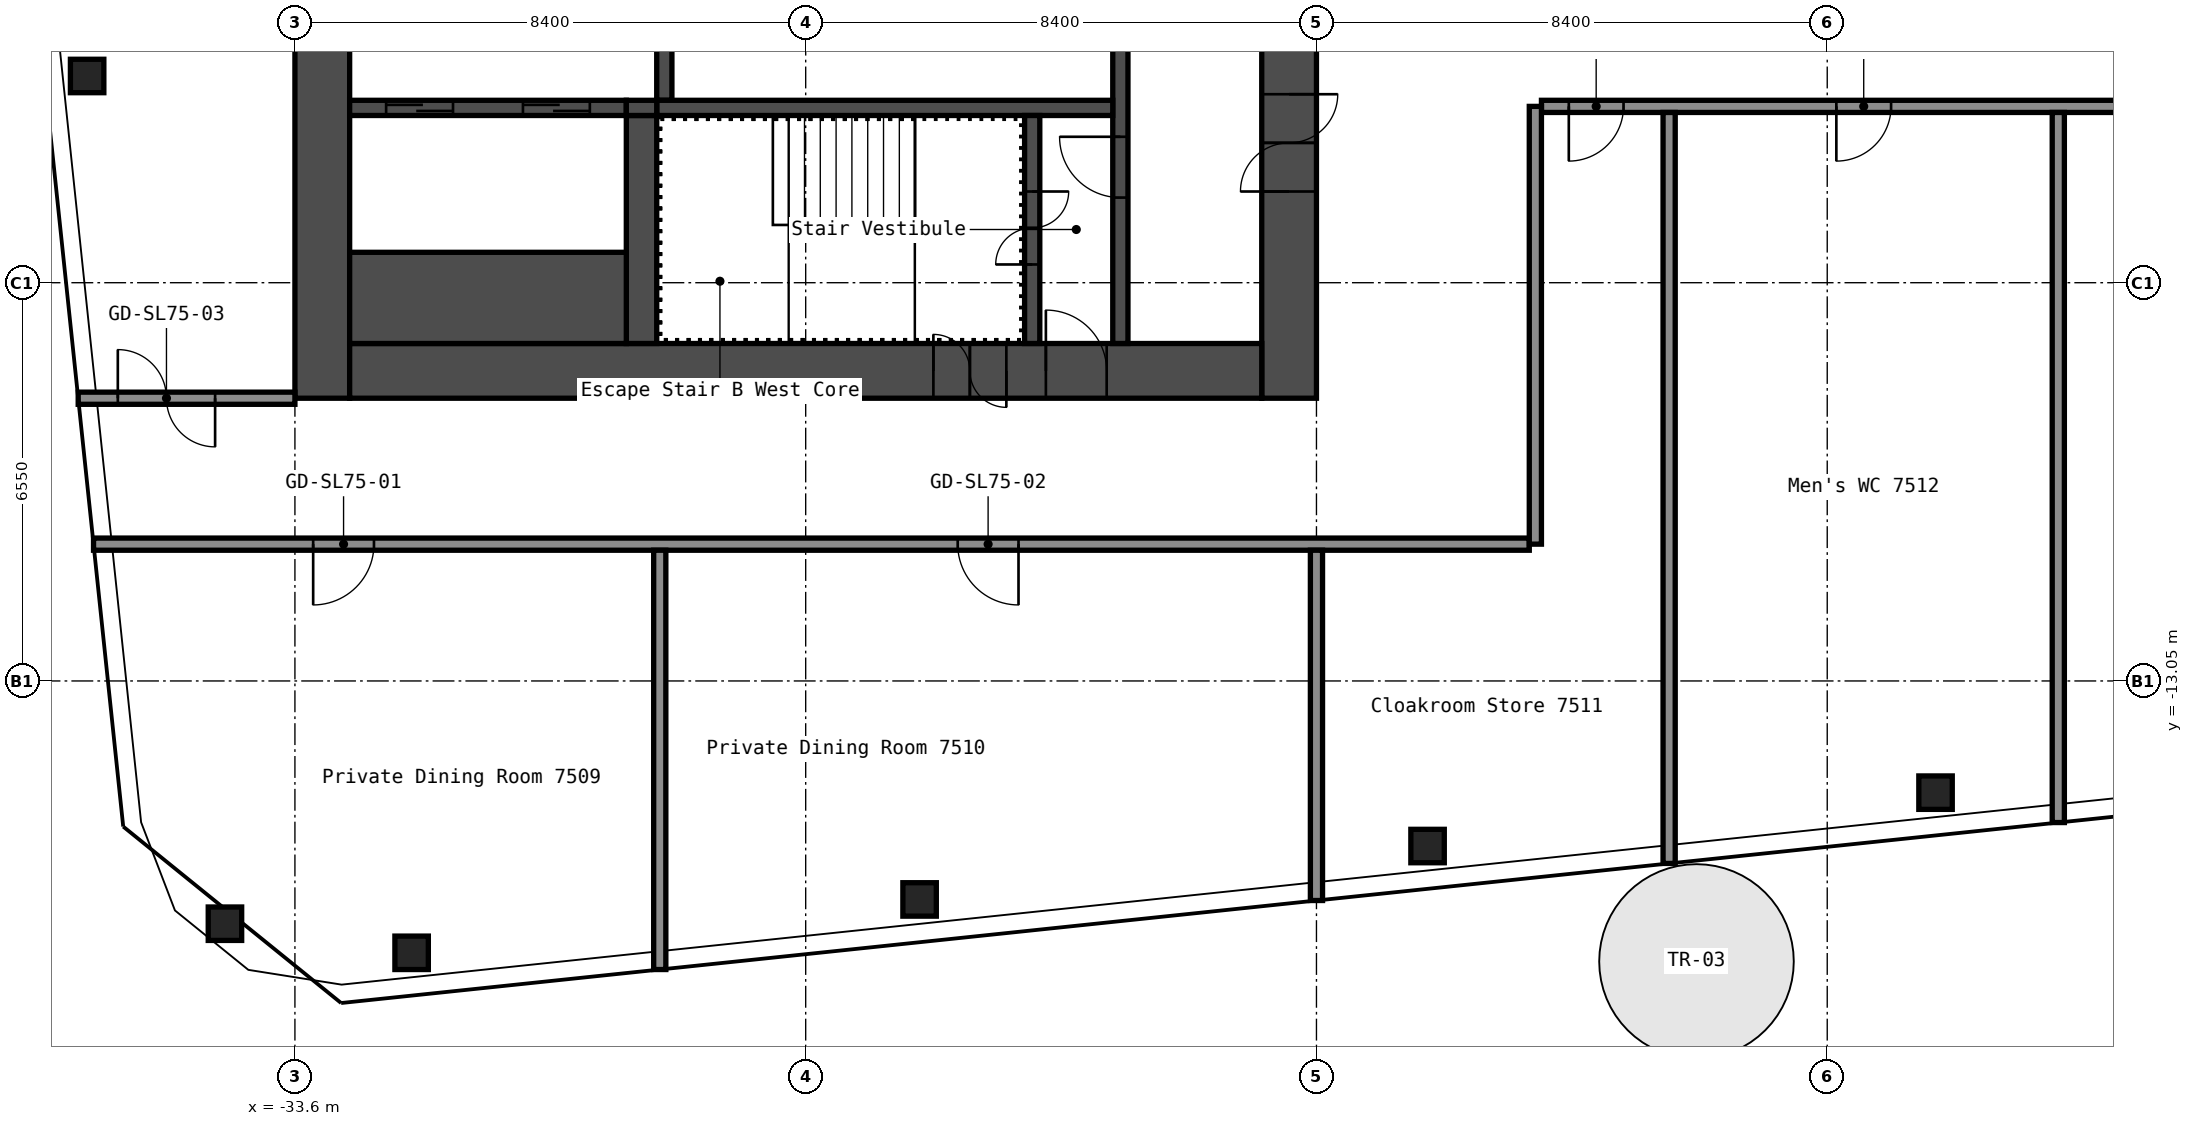
"""IFC4 building model, lengths in metres.
Left out: names, types, materials, properties, quantities, classifications, styles, units other than length and angle.
Written with IfcOpenShell. Run it as: python <this file> out.ifc"""

import sys

from ifc_helpers import new_model, si_unit, direction, frame, frame_2d, origin, origin_2d, place, context, subcontext, project, spatial, rectangle, hollow_rectangle, extrude, element, fill, save


model = new_model("IFC4")
c1 = context("Model", 3, precision=1e-05, world=origin(), true_north=direction((0.0, 1.0)))
c2 = subcontext(c1, "Body", "Model", "MODEL_VIEW")
j1 = project(units=[si_unit("LENGTHUNIT", "METRE"), si_unit("PLANEANGLEUNIT", "RADIAN")], contexts=[c1])
p1 = place(None, origin())
s1 = spatial("IfcSite", under=j1, at=p1, CompositionType="ELEMENT")
p2 = place(p1, origin())
s2 = spatial("IfcBuilding", under=s1, at=p2, CompositionType="ELEMENT")
p3 = place(p2, frame((0.0, 0.0, 264.6)))
s3 = spatial("IfcBuildingStorey", under=s2, at=p3, CompositionType="ELEMENT", Elevation=264.6)
for number, where, z_axis, x_axis in (
    (1, (-34.751, -17.042, 0.0), (0.0, 0.0, 1.0), (1.0, 0.0, 0.0)),
    (2, (-37.017, -3.1, 0.0), (0.0, 0.0, 1.0), (1.0, 0.0, 0.0)),
    (3, (-31.681, -17.521, 0.0), (0.0, 0.0, 1.0), (1.0, 0.0, 0.0)),
    (4, (-23.327, -16.643, 0.0), (0.0, 0.0, 1.0), (1.0, 0.0, 0.0)),
    (5, (-14.973, -15.765, 0.0), (0.0, 0.0, 1.0), (1.0, 0.0, 0.0)),
    (6, (-6.619, -14.887, 0.0), (0.0, 0.0, 1.0), (1.0, 0.0, 0.0)),
):
    element("IfcColumn", number, at=place(p3, frame(where, z_axis=z_axis, x_axis=x_axis)), inside=s3, PredefinedType="COLUMN", context=c2, shape_type="SweptSolid", body=[
        extrude(hollow_rectangle(XDim=0.55, YDim=0.55, WallThickness=0.022, InnerFilletRadius=0.033, OuterFilletRadius=0.055, at=origin_2d()), origin(), (0.0, 0.0, 1.0), 5.55),
    ])
p4 = place(p3, frame((-17.25, -8.4, 0.0), z_axis=(0.0, 0.0, 1.0), x_axis=(0.0, 1.0, 0.0)))
e7 = element("IfcWall", 7, at=p4, inside=s3, PredefinedType="SHEAR", context=c2, shape_type="SweptSolid", body=[
    extrude(rectangle(XDim=16.8, YDim=0.9, at=frame_2d((8.4, 0.0))), origin(), (0.0, 0.0, 1.0), 5.55),
])
p5 = place(p4, frame((3.4, 0.0, 0.0)))
e8 = element("IfcOpeningElement", 8, at=p5, cuts=e7, PredefinedType="OPENING", context=c2, shape_type="SweptSolid", body=[
    extrude(rectangle(XDim=1.6, YDim=2.1, at=frame_2d((0.8, 1.05))), frame((0.0, 0.46, 0.0), z_axis=(0.0, -1.0, 0.0), x_axis=(1.0, 0.0, 0.0)), (0.0, 0.0, 1.0), 0.92),
])
p6 = place(p4, frame((9.6, 0.0, 0.0)))
e9 = element("IfcOpeningElement", 9, at=p6, cuts=e7, PredefinedType="OPENING", context=c2, shape_type="SweptSolid", body=[
    extrude(rectangle(XDim=1.6, YDim=2.1, at=frame_2d((0.8, 1.05))), frame((0.0, 0.46, 0.0), z_axis=(0.0, -1.0, 0.0), x_axis=(1.0, 0.0, 0.0)), (0.0, 0.0, 1.0), 0.92),
])
p7 = place(p4, frame((11.8, 0.0, 0.0)))
e10 = element("IfcOpeningElement", 10, at=p7, cuts=e7, PredefinedType="OPENING", context=c2, shape_type="SweptSolid", body=[
    extrude(rectangle(XDim=1.6, YDim=2.1, at=frame_2d((0.8, 1.05))), frame((0.0, 0.46, 0.0), z_axis=(0.0, -1.0, 0.0), x_axis=(1.0, 0.0, 0.0)), (0.0, 0.0, 1.0), 0.92),
])
p8 = place(p3, frame((-33.15, -8.4, 0.0), z_axis=(0.0, 0.0, 1.0), x_axis=(0.0, 1.0, 0.0)))
e11 = element("IfcWall", 11, at=p8, inside=s3, PredefinedType="SHEAR", context=c2, shape_type="SweptSolid", body=[
    extrude(rectangle(XDim=16.8, YDim=0.9, at=frame_2d((8.4, 0.0))), origin(), (0.0, 0.0, 1.0), 5.55),
])
p9 = place(p3, frame((-32.7, -7.95, 0.0), z_axis=(0.0, 0.0, 1.0), x_axis=(1.0, 0.0, 0.0)))
e12 = element("IfcWall", 12, at=p9, inside=s3, PredefinedType="SHEAR", context=c2, shape_type="SweptSolid", body=[
    extrude(rectangle(XDim=15.0, YDim=0.9, at=frame_2d((7.5, 0.0))), origin(), (0.0, 0.0, 1.0), 5.55),
])
p10 = place(p9, frame((11.45, 0.0, 0.0)))
e13 = element("IfcOpeningElement", 13, at=p10, cuts=e12, PredefinedType="OPENING", context=c2, shape_type="SweptSolid", body=[
    extrude(rectangle(XDim=1.0, YDim=2.1, at=frame_2d((0.5, 1.05))), frame((0.0, 0.46, 0.0), z_axis=(0.0, -1.0, 0.0), x_axis=(1.0, 0.0, 0.0)), (0.0, 0.0, 1.0), 0.92),
])
p11 = place(p9, frame((9.6, 0.0, 0.0)))
e14 = element("IfcOpeningElement", 14, at=p11, cuts=e12, PredefinedType="OPENING", context=c2, shape_type="SweptSolid", body=[
    extrude(rectangle(XDim=1.2, YDim=2.1, at=frame_2d((0.6, 1.05))), frame((0.0, 0.46, 0.0), z_axis=(0.0, -1.0, 0.0), x_axis=(1.0, 0.0, 0.0)), (0.0, 0.0, 1.0), 0.92),
])
p12 = place(p3, frame((-20.025, -7.5, 0.0), z_axis=(0.0, 0.0, 1.0), x_axis=(0.0, 1.0, 0.0)))
e15 = element("IfcWall", 15, at=p12, inside=s3, PredefinedType="SHEAR", context=c2, shape_type="SweptSolid", body=[
    extrude(rectangle(XDim=6.3, YDim=0.25, at=frame_2d((3.15, 0.0))), origin(), (0.0, 0.0, 1.0), 5.55),
])
p13 = place(p12, frame((2.4, 0.0, 0.0)))
e16 = element("IfcOpeningElement", 16, at=p13, cuts=e15, PredefinedType="OPENING", context=c2, shape_type="SweptSolid", body=[
    extrude(rectangle(XDim=1.0, YDim=2.1, at=frame_2d((0.5, 1.05))), frame((0.0, 0.135, 0.0), z_axis=(0.0, -1.0, 0.0), x_axis=(1.0, 0.0, 0.0)), (0.0, 0.0, 1.0), 0.27),
])
p14 = place(p3, frame((-27.525, -3.5, 0.0), z_axis=(0.0, 0.0, 1.0), x_axis=(0.0, 1.0, 0.0)))
e17 = element("IfcWall", 17, at=p14, inside=s3, PredefinedType="SHEAR", context=c2, shape_type="SweptSolid", body=[
    extrude(rectangle(XDim=2.05, YDim=0.25, at=frame_2d((1.025, 0.0))), origin(), (0.0, 0.0, 1.0), 5.55),
])
p15 = place(p3, frame((-27.65, -3.625, 0.0), z_axis=(0.0, 0.0, 1.0), x_axis=(1.0, 0.0, 0.0)))
e18 = element("IfcWall", 18, at=p15, inside=s3, PredefinedType="SHEAR", context=c2, shape_type="SweptSolid", body=[
    extrude(rectangle(XDim=7.5, YDim=0.25, at=frame_2d((3.75, 0.0))), origin(), (0.0, 0.0, 1.0), 5.55),
])
p16 = place(p3, frame((-21.475, -7.5, 0.0), z_axis=(0.0, 0.0, 1.0), x_axis=(0.0, 1.0, 0.0)))
e19 = element("IfcWall", 19, at=p16, inside=s3, PredefinedType="SHEAR", context=c2, shape_type="SweptSolid", body=[
    extrude(rectangle(XDim=3.75, YDim=0.25, at=frame_2d((1.875, 0.0))), origin(), (0.0, 0.0, 1.0), 5.55),
])
p17 = place(p16, frame((1.3, 0.0, 0.0)))
e20 = element("IfcOpeningElement", 20, at=p17, cuts=e19, PredefinedType="OPENING", context=c2, shape_type="SweptSolid", body=[
    extrude(rectangle(XDim=1.2, YDim=2.1, at=frame_2d((0.6, 1.05))), frame((0.0, 0.135, 0.0), z_axis=(0.0, -1.0, 0.0), x_axis=(1.0, 0.0, 0.0)), (0.0, 0.0, 1.0), 0.27),
])
p18 = place(p3, frame((-27.9, -7.5, 0.0), z_axis=(0.0, 0.0, 1.0), x_axis=(0.0, 1.0, 0.0)))
e21 = element("IfcWall", 21, at=p18, inside=s3, PredefinedType="SHEAR", context=c2, shape_type="SweptSolid", body=[
    extrude(rectangle(XDim=3.75, YDim=0.5, at=frame_2d((1.875, 0.0))), origin(), (0.0, 0.0, 1.0), 5.55),
])
p19 = place(p3, frame((-32.7, -3.625, 0.0), z_axis=(0.0, 0.0, 1.0), x_axis=(1.0, 0.0, 0.0)))
e22 = element("IfcWall", 22, at=p19, inside=s3, PredefinedType="SHEAR", context=c2, shape_type="SweptSolid", body=[
    extrude(rectangle(XDim=4.55, YDim=0.25, at=frame_2d((2.275, 0.0))), origin(), (0.0, 0.0, 1.0), 5.55),
])
p20 = place(p19, frame((2.85, 0.0, 0.0)))
e23 = element("IfcOpeningElement", 23, at=p20, cuts=e22, PredefinedType="OPENING", context=c2, shape_type="SweptSolid", body=[
    extrude(rectangle(XDim=1.1, YDim=2.1, at=frame_2d((0.55, 1.05))), frame((0.0, 0.135, 0.0), z_axis=(0.0, -1.0, 0.0), x_axis=(1.0, 0.0, 0.0)), (0.0, 0.0, 1.0), 0.27),
])
p21 = place(p19, frame((0.6, 0.0, 0.0)))
e24 = element("IfcOpeningElement", 24, at=p21, cuts=e22, PredefinedType="OPENING", context=c2, shape_type="SweptSolid", body=[
    extrude(rectangle(XDim=1.1, YDim=2.1, at=frame_2d((0.55, 1.05))), frame((0.0, 0.135, 0.0), z_axis=(0.0, -1.0, 0.0), x_axis=(1.0, 0.0, 0.0)), (0.0, 0.0, 1.0), 0.27),
])
p22 = place(p3, frame((-32.7, -6.75, 0.0), z_axis=(0.0, 0.0, 1.0), x_axis=(1.0, 0.0, 0.0)))
e25 = element("IfcWall", 25, at=p22, inside=s3, PredefinedType="SHEAR", context=c2, shape_type="SweptSolid", body=[
    extrude(rectangle(XDim=4.55, YDim=1.5, at=frame_2d((2.275, 0.0))), origin(), (0.0, 0.0, 1.0), 5.55),
])
p23 = place(p3, frame((-28.15, -3.625, 0.0), z_axis=(0.0, 0.0, 1.0), x_axis=(1.0, 0.0, 0.0)))
e26 = element("IfcWall", 26, at=p23, inside=s3, PredefinedType="SHEAR", context=c2, shape_type="SweptSolid", body=[
    extrude(rectangle(XDim=0.5, YDim=0.25, at=frame_2d((0.25, 0.0))), origin(), (0.0, 0.0, 1.0), 5.55),
])
p24 = place(p3, frame((-36.912, -10.8, 0.0), z_axis=(0.0, 0.0, 1.0), x_axis=(1.0, 0.0, 0.0)))
e27 = element("IfcWall", 27, at=p24, inside=s3, PredefinedType="PARTITIONING", context=c2, shape_type="SweptSolid", body=[
    extrude(rectangle(XDim=23.612, YDim=0.2, at=frame_2d((11.806, 0.0))), origin(), (0.0, 0.0, 1.0), 5.55),
])
p25 = place(p24, frame((3.612, 0.0, 0.0)))
e28 = element("IfcOpeningElement", 28, at=p25, cuts=e27, PredefinedType="OPENING", context=c2, shape_type="SweptSolid", body=[
    extrude(rectangle(XDim=1.0, YDim=2.1, at=frame_2d((0.5, 1.05))), frame((0.0, 0.11, 0.0), z_axis=(0.0, -1.0, 0.0), x_axis=(1.0, 0.0, 0.0)), (0.0, 0.0, 1.0), 0.22),
])
p26 = place(p24, frame((14.212, 0.0, 0.0)))
e29 = element("IfcOpeningElement", 29, at=p26, cuts=e27, PredefinedType="OPENING", context=c2, shape_type="SweptSolid", body=[
    extrude(rectangle(XDim=1.0, YDim=2.1, at=frame_2d((0.5, 1.05))), frame((0.0, 0.11, 0.0), z_axis=(0.0, -1.0, 0.0), x_axis=(1.0, 0.0, 0.0)), (0.0, 0.0, 1.0), 0.22),
])
p27 = place(p3, frame((-37.164, -8.4, 0.0), z_axis=(0.0, 0.0, 1.0), x_axis=(1.0, 0.0, 0.0)))
e30 = element("IfcWall", 30, at=p27, inside=s3, PredefinedType="PARTITIONING", context=c2, shape_type="SweptSolid", body=[
    extrude(rectangle(XDim=3.564, YDim=0.2, at=frame_2d((1.782, 0.0))), origin(), (0.0, 0.0, 1.0), 5.55),
])
p28 = place(p27, frame((0.652, 0.0, 0.0)))
e31 = element("IfcOpeningElement", 31, at=p28, cuts=e30, PredefinedType="OPENING", context=c2, shape_type="SweptSolid", body=[
    extrude(rectangle(XDim=1.6, YDim=2.1, at=frame_2d((0.8, 1.05))), frame((0.0, 0.11, 0.0), z_axis=(0.0, -1.0, 0.0), x_axis=(1.0, 0.0, 0.0)), (0.0, 0.0, 1.0), 0.22),
])
p29 = place(p3, frame((-13.1, -3.6, 0.0), z_axis=(0.0, 0.0, 1.0), x_axis=(1.0, 0.0, 0.0)))
e32 = element("IfcWall", 32, at=p29, inside=s3, PredefinedType="PARTITIONING", context=c2, shape_type="SweptSolid", body=[
    extrude(rectangle(XDim=15.2, YDim=0.2, at=frame_2d((7.6, 0.0))), origin(), (0.0, 0.0, 1.0), 5.55),
])
p30 = place(p29, frame((0.45, 0.0, 0.0)))
e33 = element("IfcOpeningElement", 33, at=p30, cuts=e32, PredefinedType="OPENING", context=c2, shape_type="SweptSolid", body=[
    extrude(rectangle(XDim=0.9, YDim=2.1, at=frame_2d((0.45, 1.05))), frame((0.0, 0.11, 0.0), z_axis=(0.0, -1.0, 0.0), x_axis=(1.0, 0.0, 0.0)), (0.0, 0.0, 1.0), 0.22),
])
p31 = place(p29, frame((4.85, 0.0, 0.0)))
e34 = element("IfcOpeningElement", 34, at=p31, cuts=e32, PredefinedType="OPENING", context=c2, shape_type="SweptSolid", body=[
    extrude(rectangle(XDim=0.9, YDim=2.1, at=frame_2d((0.45, 1.05))), frame((0.0, 0.11, 0.0), z_axis=(0.0, -1.0, 0.0), x_axis=(1.0, 0.0, 0.0)), (0.0, 0.0, 1.0), 0.22),
])
p32 = place(p29, frame((11.45, 0.0, 0.0)))
e35 = element("IfcOpeningElement", 35, at=p32, cuts=e32, PredefinedType="OPENING", context=c2, shape_type="SweptSolid", body=[
    extrude(rectangle(XDim=0.9, YDim=2.1, at=frame_2d((0.45, 1.05))), frame((0.0, 0.11, 0.0), z_axis=(0.0, -1.0, 0.0), x_axis=(1.0, 0.0, 0.0)), (0.0, 0.0, 1.0), 0.22),
])
p33 = place(p3, frame((-27.6, -17.796, 0.0), z_axis=(0.0, 0.0, 1.0), x_axis=(0.0, 1.0, 0.0)))
e36 = element("IfcWall", 36, at=p33, inside=s3, PredefinedType="PARTITIONING", context=c2, shape_type="SweptSolid", body=[
    extrude(rectangle(XDim=6.896, YDim=0.2, at=frame_2d((3.448, 0.0))), origin(), (0.0, 0.0, 1.0), 5.55),
])
p34 = place(p3, frame((-16.8, -16.661, 0.0), z_axis=(0.0, 0.0, 1.0), x_axis=(0.0, 1.0, 0.0)))
e37 = element("IfcWall", 37, at=p34, inside=s3, PredefinedType="PARTITIONING", context=c2, shape_type="SweptSolid", body=[
    extrude(rectangle(XDim=5.761, YDim=0.2, at=frame_2d((2.88, 0.0))), origin(), (0.0, 0.0, 1.0), 5.55),
])
p35 = place(p3, frame((-13.2, -10.8, 0.0), z_axis=(0.0, 0.0, 1.0), x_axis=(0.0, 1.0, 0.0)))
e38 = element("IfcWall", 38, at=p35, inside=s3, PredefinedType="PARTITIONING", context=c2, shape_type="SweptSolid", body=[
    extrude(rectangle(XDim=7.2, YDim=0.2, at=frame_2d((3.6, 0.0))), origin(), (0.0, 0.0, 1.0), 5.55),
])
p36 = place(p3, frame((-11.0, -16.052, 0.0), z_axis=(0.0, 0.0, 1.0), x_axis=(0.0, 1.0, 0.0)))
e39 = element("IfcWall", 39, at=p36, inside=s3, PredefinedType="PARTITIONING", context=c2, shape_type="SweptSolid", body=[
    extrude(rectangle(XDim=12.352, YDim=0.2, at=frame_2d((6.176, 0.0))), origin(), (0.0, 0.0, 1.0), 5.55),
])
p37 = place(p3, frame((-4.6, -15.379, 0.0), z_axis=(0.0, 0.0, 1.0), x_axis=(0.0, 1.0, 0.0)))
e40 = element("IfcWall", 40, at=p37, inside=s3, PredefinedType="PARTITIONING", context=c2, shape_type="SweptSolid", body=[
    extrude(rectangle(XDim=11.679, YDim=0.2, at=frame_2d((5.839, 0.0))), origin(), (0.0, 0.0, 1.0), 5.55),
])
p38 = place(p5, origin())
e41 = element("IfcDoor", 41, at=p38, inside=s3, OperationType="DOUBLE_DOOR_SINGLE_SWING", PredefinedType="DOOR", context=c2, shape_type="SweptSolid", body=[
    extrude(rectangle(XDim=1.6, YDim=2.1, at=frame_2d((0.8, 1.05))), frame((0.0, 0.025, 0.0), z_axis=(0.0, -1.0, 0.0), x_axis=(1.0, 0.0, 0.0)), (0.0, 0.0, 1.0), 0.05),
])
fill(e8, e41)
p39 = place(p10, origin())
e42 = element("IfcDoor", 42, at=p39, inside=s3, OperationType="SINGLE_SWING_RIGHT", PredefinedType="DOOR", context=c2, shape_type="SweptSolid", body=[
    extrude(rectangle(XDim=1.0, YDim=2.1, at=frame_2d((0.5, 1.05))), frame((0.0, 0.025, 0.0), z_axis=(0.0, -1.0, 0.0), x_axis=(1.0, 0.0, 0.0)), (0.0, 0.0, 1.0), 0.05),
])
fill(e13, e42)
p40 = place(p11, origin())
e43 = element("IfcDoor", 43, at=p40, inside=s3, OperationType="DOUBLE_DOOR_SINGLE_SWING", PredefinedType="DOOR", context=c2, shape_type="SweptSolid", body=[
    extrude(rectangle(XDim=1.2, YDim=2.1, at=frame_2d((0.6, 1.05))), frame((0.0, 0.025, 0.0), z_axis=(0.0, -1.0, 0.0), x_axis=(1.0, 0.0, 0.0)), (0.0, 0.0, 1.0), 0.05),
])
fill(e14, e43)
p41 = place(p17, origin())
e44 = element("IfcDoor", 44, at=p41, inside=s3, OperationType="DOUBLE_DOOR_SINGLE_SWING", PredefinedType="DOOR", context=c2, shape_type="SweptSolid", body=[
    extrude(rectangle(XDim=1.2, YDim=2.1, at=frame_2d((0.6, 1.05))), frame((0.0, 0.025, 0.0), z_axis=(0.0, -1.0, 0.0), x_axis=(1.0, 0.0, 0.0)), (0.0, 0.0, 1.0), 0.05),
])
fill(e20, e44)
p42 = place(p13, origin())
e45 = element("IfcDoor", 45, at=p42, inside=s3, OperationType="SINGLE_SWING_LEFT", PredefinedType="DOOR", context=c2, shape_type="SweptSolid", body=[
    extrude(rectangle(XDim=1.0, YDim=2.1, at=frame_2d((0.5, 1.05))), frame((0.0, 0.025, 0.0), z_axis=(0.0, -1.0, 0.0), x_axis=(1.0, 0.0, 0.0)), (0.0, 0.0, 1.0), 0.05),
])
fill(e16, e45)
p43 = place(p20, origin())
e46 = element("IfcDoor", 46, at=p43, inside=s3, OperationType="DOUBLE_DOOR_SLIDING", PredefinedType="DOOR", context=c2, shape_type="SweptSolid", body=[
    extrude(rectangle(XDim=1.1, YDim=2.1, at=frame_2d((0.55, 1.05))), frame((0.0, 0.025, 0.0), z_axis=(0.0, -1.0, 0.0), x_axis=(1.0, 0.0, 0.0)), (0.0, 0.0, 1.0), 0.05),
])
fill(e23, e46)
p44 = place(p21, origin())
e47 = element("IfcDoor", 47, at=p44, inside=s3, OperationType="DOUBLE_DOOR_SLIDING", PredefinedType="DOOR", context=c2, shape_type="SweptSolid", body=[
    extrude(rectangle(XDim=1.1, YDim=2.1, at=frame_2d((0.55, 1.05))), frame((0.0, 0.025, 0.0), z_axis=(0.0, -1.0, 0.0), x_axis=(1.0, 0.0, 0.0)), (0.0, 0.0, 1.0), 0.05),
])
fill(e24, e47)
p45 = place(p25, origin())
e48 = element("IfcDoor", 48, at=p45, inside=s3, OperationType="SINGLE_SWING_LEFT", PredefinedType="DOOR", context=c2, shape_type="SweptSolid", body=[
    extrude(rectangle(XDim=1.0, YDim=2.1, at=frame_2d((0.5, 1.05))), frame((0.0, 0.025, 0.0), z_axis=(0.0, -1.0, 0.0), x_axis=(1.0, 0.0, 0.0)), (0.0, 0.0, 1.0), 0.05),
])
fill(e28, e48)
p46 = place(p26, origin())
e49 = element("IfcDoor", 49, at=p46, inside=s3, OperationType="SINGLE_SWING_RIGHT", PredefinedType="DOOR", context=c2, shape_type="SweptSolid", body=[
    extrude(rectangle(XDim=1.0, YDim=2.1, at=frame_2d((0.5, 1.05))), frame((0.0, 0.025, 0.0), z_axis=(0.0, -1.0, 0.0), x_axis=(1.0, 0.0, 0.0)), (0.0, 0.0, 1.0), 0.05),
])
fill(e29, e49)
p47 = place(p28, origin())
e50 = element("IfcDoor", 50, at=p47, inside=s3, OperationType="DOUBLE_DOOR_SINGLE_SWING", PredefinedType="DOOR", context=c2, shape_type="SweptSolid", body=[
    extrude(rectangle(XDim=1.6, YDim=2.1, at=frame_2d((0.8, 1.05))), frame((0.0, 0.025, 0.0), z_axis=(0.0, -1.0, 0.0), x_axis=(1.0, 0.0, 0.0)), (0.0, 0.0, 1.0), 0.05),
])
fill(e31, e50)
p48 = place(p30, origin())
e51 = element("IfcDoor", 51, at=p48, inside=s3, OperationType="SINGLE_SWING_LEFT", PredefinedType="DOOR", context=c2, shape_type="SweptSolid", body=[
    extrude(rectangle(XDim=0.9, YDim=2.1, at=frame_2d((0.45, 1.05))), frame((0.0, 0.025, 0.0), z_axis=(0.0, -1.0, 0.0), x_axis=(1.0, 0.0, 0.0)), (0.0, 0.0, 1.0), 0.05),
])
fill(e33, e51)
p49 = place(p31, origin())
e52 = element("IfcDoor", 52, at=p49, inside=s3, OperationType="SINGLE_SWING_LEFT", PredefinedType="DOOR", context=c2, shape_type="SweptSolid", body=[
    extrude(rectangle(XDim=0.9, YDim=2.1, at=frame_2d((0.45, 1.05))), frame((0.0, 0.025, 0.0), z_axis=(0.0, -1.0, 0.0), x_axis=(1.0, 0.0, 0.0)), (0.0, 0.0, 1.0), 0.05),
])
fill(e34, e52)
save(model, sys.argv[1])
